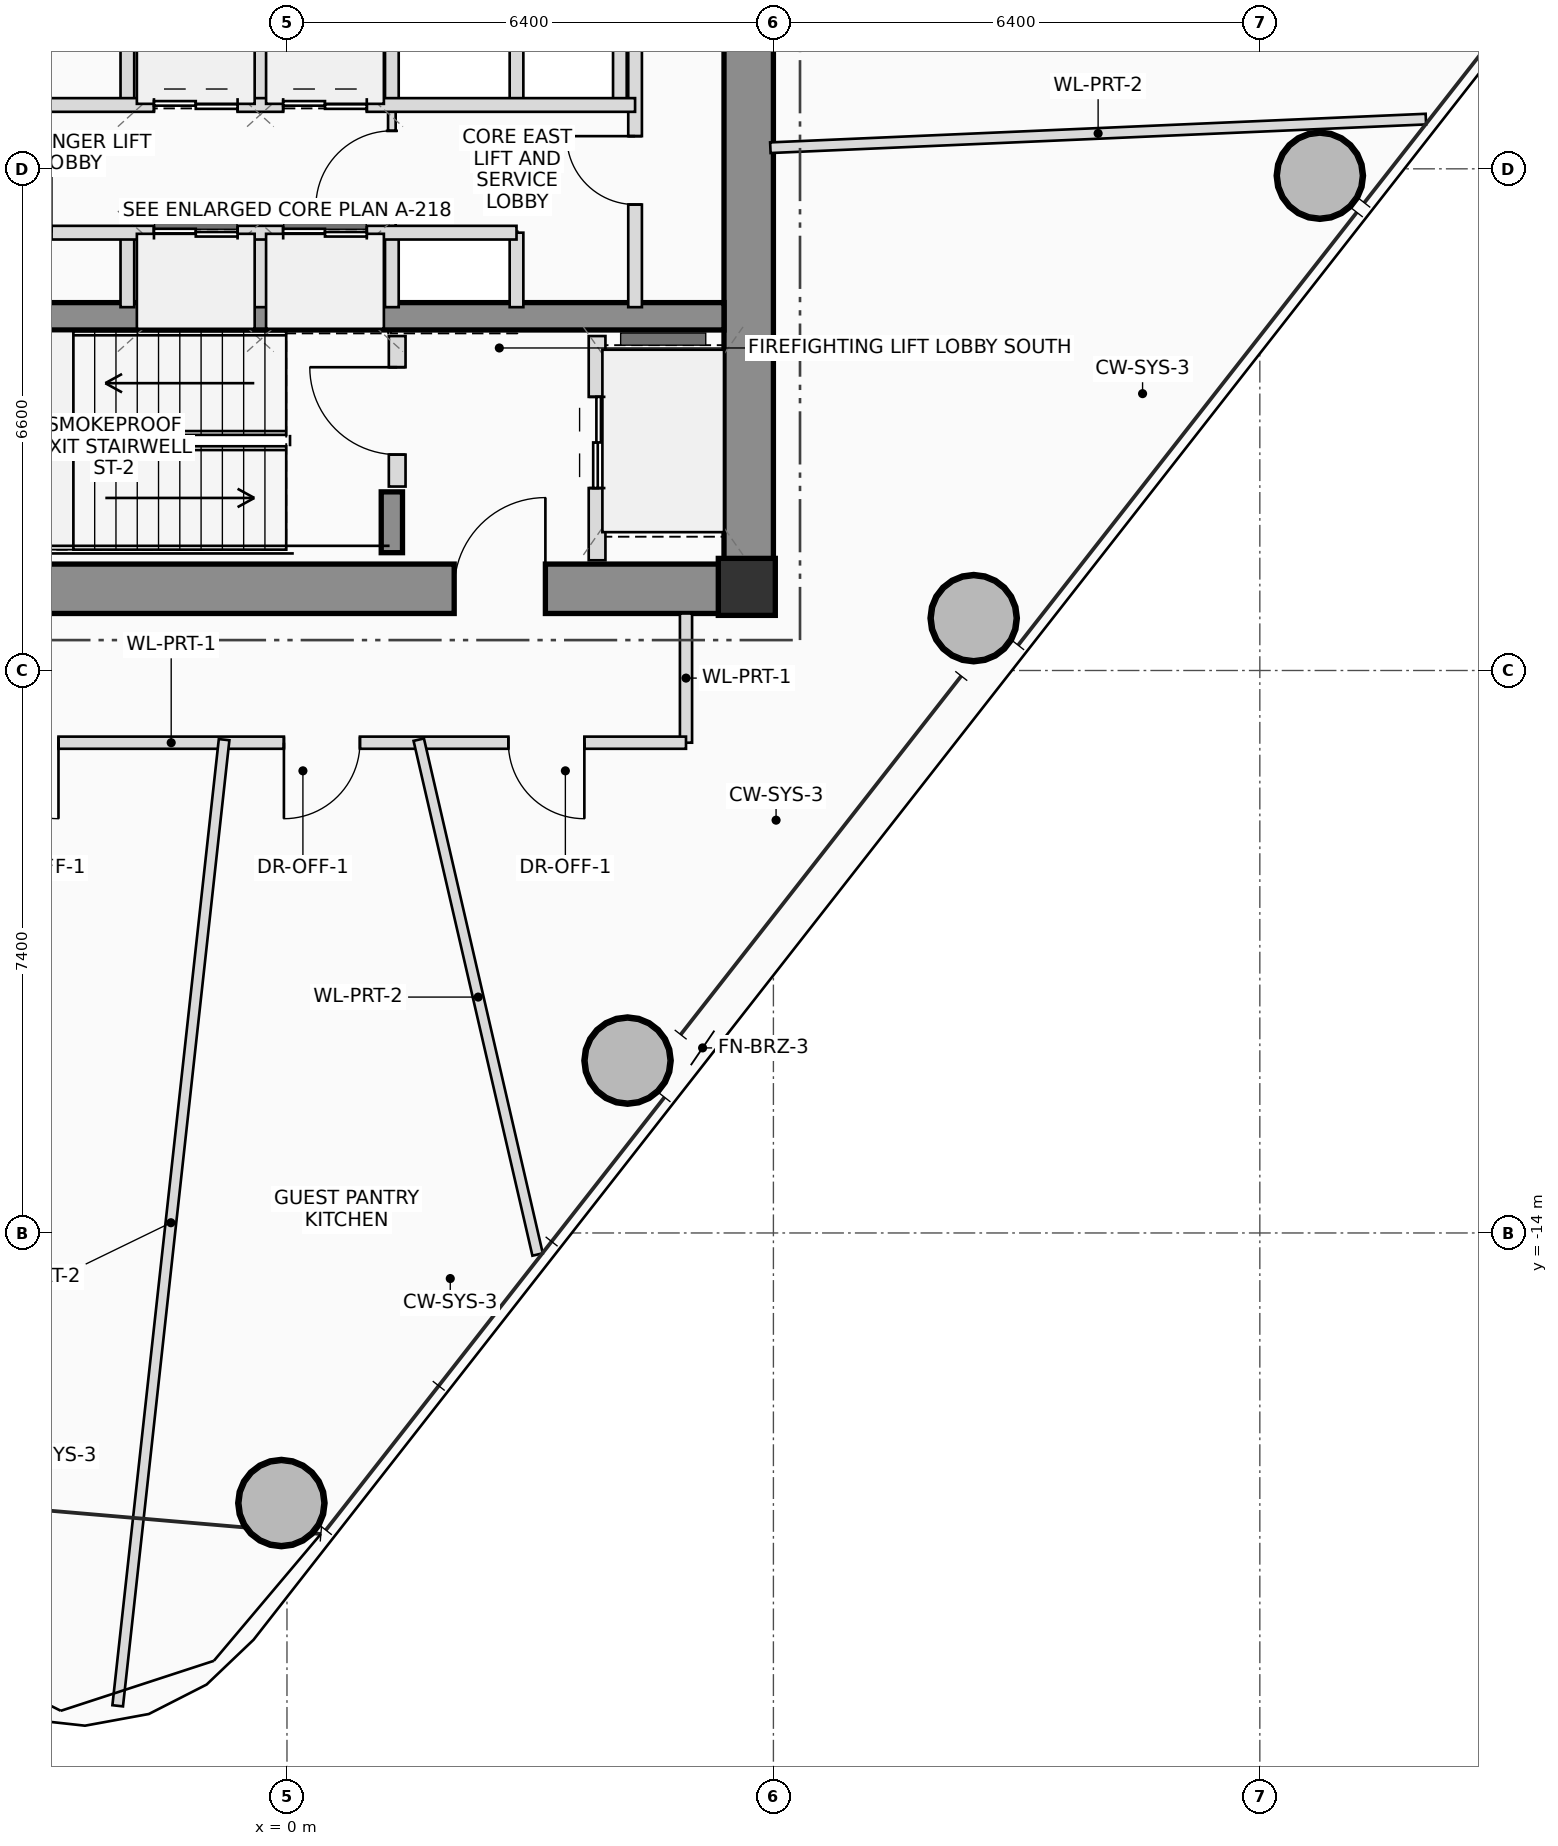
"""IFC4 building model, lengths in metres.
Left out: names, types, materials, properties, quantities, classifications, styles, units other than length and angle.
Written with IfcOpenShell. Run it as: python <this file> out.ifc"""

import sys

from ifc_helpers import new_model, si_unit, direction, frame, frame_2d, origin, origin_2d, place, context, subcontext, project, spatial, rectangle, hollow_circle, extrude, source, transform, mapped, element, fill, save


model = new_model("IFC4")
c1 = context("Model", 3, precision=1e-05, world=origin(), true_north=direction((0.0, 1.0)))
c2 = subcontext(c1, "Body", "Model", "MODEL_VIEW")
j1 = project(units=[si_unit("LENGTHUNIT", "METRE"), si_unit("PLANEANGLEUNIT", "RADIAN")], contexts=[c1])
p1 = place(None, origin())
s1 = spatial("IfcSite", under=j1, at=p1, CompositionType="ELEMENT")
p2 = place(p1, origin())
s2 = spatial("IfcBuilding", under=s1, at=p2, CompositionType="ELEMENT")
p3 = place(p2, frame((0.0, 0.0, 201.8)))
s3 = spatial("IfcBuildingStorey", under=s2, at=p3, CompositionType="ELEMENT", Elevation=201.8)
m1 = source(origin(), c2, "Body", "SweptSolid", [
    extrude(rectangle(XDim=0.75, YDim=0.75, at=origin_2d()), origin(), (0.0, 0.0, 1.0), 3.45),
])
p4 = place(p3, frame((6.05, -5.5, 0.0), z_axis=(0.0, 0.0, 1.0), x_axis=(1.0, 0.0, 0.0)))
e1 = element("IfcColumn", 1, at=p4, inside=s3, PredefinedType="COLUMN", context=c2, shape_type="MappedRepresentation", body=[
    mapped(m1, transform((0.0, 0.0, 0.0), scale=1.0)),
])
p5 = place(p3, frame((-6.4, -5.525, 0.0), z_axis=(0.0, 0.0, 1.0), x_axis=(1.0, 0.0, 0.0)))
e2 = element("IfcWall", 2, at=p5, inside=s3, PredefinedType="SHEAR", context=c2, shape_type="SweptSolid", body=[
    extrude(rectangle(XDim=12.8, YDim=0.65, at=frame_2d((6.4, 0.0))), origin(), (0.0, 0.0, 1.0), 3.45),
])
p6 = place(p5, frame((8.6, 0.0, 0.0)))
e3 = element("IfcOpeningElement", 3, at=p6, cuts=e2, PredefinedType="OPENING", context=c2, shape_type="SweptSolid", body=[
    extrude(rectangle(XDim=1.2, YDim=2.2, at=frame_2d((0.6, 1.1))), frame((0.0, 0.335, 0.0), z_axis=(0.0, -1.0, 0.0), x_axis=(1.0, 0.0, 0.0)), (0.0, 0.0, 1.0), 0.67),
])
p7 = place(p3, frame((6.075, -5.2, 0.0), z_axis=(0.0, 0.0, 1.0), x_axis=(0.0, 1.0, 0.0)))
e4 = element("IfcWall", 4, at=p7, inside=s3, PredefinedType="SHEAR", context=c2, shape_type="SweptSolid", body=[
    extrude(rectangle(XDim=10.4, YDim=0.65, at=frame_2d((5.2, 0.0))), origin(), (0.0, 0.0, 1.0), 3.45),
])
p8 = place(p3, frame((-5.75, -1.94, 0.0), z_axis=(0.0, 0.0, 1.0), x_axis=(1.0, 0.0, 0.0)))
e5 = element("IfcWall", 5, at=p8, inside=s3, PredefinedType="SHEAR", context=c2, shape_type="SweptSolid", body=[
    extrude(rectangle(XDim=11.5, YDim=0.36, at=frame_2d((5.75, 0.0))), origin(), (0.0, 0.0, 1.0), 3.45),
])
p9 = place(p3, frame((1.38, -5.05, 0.0), z_axis=(0.0, 0.0, 1.0), x_axis=(0.0, 1.0, 0.0)))
e6 = element("IfcWall", 6, at=p9, inside=s3, PredefinedType="SHEAR", context=c2, shape_type="SweptSolid", body=[
    extrude(rectangle(XDim=0.8, YDim=0.28, at=frame_2d((0.4, 0.0))), origin(), (0.0, 0.0, 1.0), 3.45),
])
m2 = source(origin(), c2, "Body", "SweptSolid", [
    extrude(hollow_circle(Radius=0.575, WallThickness=0.042, at=origin_2d()), origin(), (0.0, 0.0, 1.0), 3.45),
])
for number, where, z_axis, x_axis in (
    (7, (-0.073, -17.553, 0.0), (0.0, 0.0, 1.0), (1.0, 0.0, 0.0)),
    (8, (4.481, -11.732, 0.0), (0.0, 0.0, 1.0), (1.0, 0.0, 0.0)),
    (9, (9.035, -5.911, 0.0), (0.0, 0.0, 1.0), (1.0, 0.0, 0.0)),
    (10, (13.59, -0.09, 0.0), (0.0, 0.0, 1.0), (1.0, 0.0, 0.0)),
):
    element("IfcColumn", number, at=place(p3, frame(where, z_axis=z_axis, x_axis=x_axis)), inside=s3, PredefinedType="COLUMN", context=c2, shape_type="MappedRepresentation", body=[
        mapped(m2, transform((0.0, 0.0, 0.0), scale=1.0)),
    ])
p10 = place(p3, frame((1.45, -4.18, 0.0), z_axis=(0.0, 0.0, 1.0), x_axis=(0.0, 1.0, 0.0)))
e11 = element("IfcWall", 11, at=p10, inside=s3, PredefinedType="PLUMBINGWALL", context=c2, shape_type="SweptSolid", body=[
    extrude(rectangle(XDim=1.98, YDim=0.22, at=frame_2d((0.99, 0.0))), origin(), (0.0, 0.0, 1.0), 3.25),
])
p11 = place(p10, frame((0.42, 0.0, 0.0)))
e12 = element("IfcOpeningElement", 12, at=p11, cuts=e11, PredefinedType="OPENING", context=c2, shape_type="SweptSolid", body=[
    extrude(rectangle(XDim=1.15, YDim=2.15, at=frame_2d((0.575, 1.075))), frame((0.0, 0.12, 0.0), z_axis=(0.0, -1.0, 0.0), x_axis=(1.0, 0.0, 0.0)), (0.0, 0.0, 1.0), 0.24),
])
p12 = place(p3, frame((4.08, -5.15, 0.0), z_axis=(0.0, 0.0, 1.0), x_axis=(0.0, 1.0, 0.0)))
e13 = element("IfcWall", 13, at=p12, inside=s3, PredefinedType="PLUMBINGWALL", context=c2, shape_type="SweptSolid", body=[
    extrude(rectangle(XDim=2.95, YDim=0.22, at=frame_2d((1.475, 0.0))), origin(), (0.0, 0.0, 1.0), 3.25),
])
p13 = place(p12, frame((0.95, 0.0, 0.0)))
e14 = element("IfcOpeningElement", 14, at=p13, cuts=e13, PredefinedType="OPENING", context=c2, shape_type="SweptSolid", body=[
    extrude(rectangle(XDim=1.2, YDim=2.25, at=frame_2d((0.6, 1.125))), frame((0.0, 0.12, 0.0), z_axis=(0.0, -1.0, 0.0), x_axis=(1.0, 0.0, 0.0)), (0.0, 0.0, 1.0), 0.24),
])
p14 = place(p3, frame((1.38, -0.84, 0.0), z_axis=(0.0, 0.0, 1.0), x_axis=(0.0, 1.0, 0.0)))
e15 = element("IfcWall", 15, at=p14, inside=s3, PredefinedType="PARTITIONING", context=c2, shape_type="SweptSolid", body=[
    extrude(rectangle(XDim=1.68, YDim=0.1, at=frame_2d((0.84, 0.0))), origin(), (0.0, 0.0, 1.0), 3.25),
])
p15 = place(p14, frame((0.34, 0.0, 0.0)))
e16 = element("IfcOpeningElement", 16, at=p15, cuts=e15, PredefinedType="OPENING", context=c2, shape_type="SweptSolid", body=[
    extrude(rectangle(XDim=1.0, YDim=2.25, at=frame_2d((0.5, 1.125))), frame((0.0, 0.06, 0.0), z_axis=(0.0, -1.0, 0.0), x_axis=(1.0, 0.0, 0.0)), (0.0, 0.0, 1.0), 0.12),
])
for number, where, z_axis, x_axis in (
    (17, (-2.1, 0.84, 0.0), (0.0, 0.0, 1.0), (0.0, 1.0, 0.0)),
    (18, (-2.1, -1.82, 0.0), (0.0, 0.0, 1.0), (0.0, 1.0, 0.0)),
    (19, (-0.35, 0.84, 0.0), (0.0, 0.0, 1.0), (0.0, 1.0, 0.0)),
    (20, (-0.35, -1.82, 0.0), (0.0, 0.0, 1.0), (0.0, 1.0, 0.0)),
    (21, (1.38, 0.84, 0.0), (0.0, 0.0, 1.0), (0.0, 1.0, 0.0)),
    (22, (1.38, -1.82, 0.0), (0.0, 0.0, 1.0), (0.0, 1.0, 0.0)),
    (23, (3.02, 0.84, 0.0), (0.0, 0.0, 1.0), (0.0, 1.0, 0.0)),
    (24, (4.38, 0.84, 0.0), (0.0, 0.0, 1.0), (0.0, 1.0, 0.0)),
    (25, (3.02, -1.82, 0.0), (0.0, 0.0, 1.0), (0.0, 1.0, 0.0)),
):
    element("IfcWall", number, at=place(p3, frame(where, z_axis=z_axis, x_axis=x_axis)), inside=s3, PredefinedType="PLUMBINGWALL", context=c2, shape_type="SweptSolid", body=[
        extrude(rectangle(XDim=0.98, YDim=0.18, at=frame_2d((0.49, 0.0))), origin(), (0.0, 0.0, 1.0), 3.25),
    ])
p16 = place(p3, frame((4.58, -1.82, 0.0), z_axis=(0.0, 0.0, 1.0), x_axis=(0.0, 1.0, 0.0)))
e26 = element("IfcWall", 26, at=p16, inside=s3, PredefinedType="PLUMBINGWALL", context=c2, shape_type="SweptSolid", body=[
    extrude(rectangle(XDim=3.64, YDim=0.18, at=frame_2d((1.82, 0.0))), origin(), (0.0, 0.0, 1.0), 3.25),
])
p17 = place(p16, frame((1.35, 0.0, 0.0)))
e27 = element("IfcOpeningElement", 27, at=p17, cuts=e26, PredefinedType="OPENING", context=c2, shape_type="SweptSolid", body=[
    extrude(rectangle(XDim=0.9, YDim=2.05, at=frame_2d((0.45, 1.025))), frame((0.0, 0.1, 0.0), z_axis=(0.0, -1.0, 0.0), x_axis=(1.0, 0.0, 0.0)), (0.0, 0.0, 1.0), 0.2),
])
p18 = place(p3, frame((-5.68, 0.84, 0.0), z_axis=(0.0, 0.0, 1.0), x_axis=(1.0, 0.0, 0.0)))
e28 = element("IfcWall", 28, at=p18, inside=s3, PredefinedType="PLUMBINGWALL", context=c2, shape_type="SweptSolid", body=[
    extrude(rectangle(XDim=10.26, YDim=0.18, at=frame_2d((5.13, 0.0))), origin(), (0.0, 0.0, 1.0), 3.25),
])
p19 = place(p18, frame((1.08, 0.0, 0.0)))
e29 = element("IfcOpeningElement", 29, at=p19, cuts=e28, PredefinedType="OPENING", context=c2, shape_type="SweptSolid", body=[
    extrude(rectangle(XDim=0.9, YDim=2.05, at=frame_2d((0.45, 1.025))), frame((0.0, 0.1, 0.0), z_axis=(0.0, -1.0, 0.0), x_axis=(1.0, 0.0, 0.0)), (0.0, 0.0, 1.0), 0.2),
])
p20 = place(p18, frame((3.93, 0.0, 0.0)))
e30 = element("IfcOpeningElement", 30, at=p20, cuts=e28, PredefinedType="OPENING", context=c2, shape_type="SweptSolid", body=[
    extrude(rectangle(XDim=1.1, YDim=2.2, at=frame_2d((0.55, 1.1))), frame((0.0, 0.1, 0.0), z_axis=(0.0, -1.0, 0.0), x_axis=(1.0, 0.0, 0.0)), (0.0, 0.0, 1.0), 0.2),
])
p21 = place(p18, frame((5.63, 0.0, 0.0)))
e31 = element("IfcOpeningElement", 31, at=p21, cuts=e28, PredefinedType="OPENING", context=c2, shape_type="SweptSolid", body=[
    extrude(rectangle(XDim=1.1, YDim=2.2, at=frame_2d((0.55, 1.1))), frame((0.0, 0.1, 0.0), z_axis=(0.0, -1.0, 0.0), x_axis=(1.0, 0.0, 0.0)), (0.0, 0.0, 1.0), 0.2),
])
p22 = place(p3, frame((-5.68, -0.84, 0.0), z_axis=(0.0, 0.0, 1.0), x_axis=(1.0, 0.0, 0.0)))
e32 = element("IfcWall", 32, at=p22, inside=s3, PredefinedType="PLUMBINGWALL", context=c2, shape_type="SweptSolid", body=[
    extrude(rectangle(XDim=8.7, YDim=0.18, at=frame_2d((4.35, 0.0))), origin(), (0.0, 0.0, 1.0), 3.25),
])
p23 = place(p22, frame((1.68, 0.0, 0.0)))
e33 = element("IfcOpeningElement", 33, at=p23, cuts=e32, PredefinedType="OPENING", context=c2, shape_type="SweptSolid", body=[
    extrude(rectangle(XDim=0.9, YDim=2.05, at=frame_2d((0.45, 1.025))), frame((0.0, 0.1, 0.0), z_axis=(0.0, -1.0, 0.0), x_axis=(1.0, 0.0, 0.0)), (0.0, 0.0, 1.0), 0.2),
])
p24 = place(p22, frame((3.93, 0.0, 0.0)))
e34 = element("IfcOpeningElement", 34, at=p24, cuts=e32, PredefinedType="OPENING", context=c2, shape_type="SweptSolid", body=[
    extrude(rectangle(XDim=1.1, YDim=2.2, at=frame_2d((0.55, 1.1))), frame((0.0, 0.1, 0.0), z_axis=(0.0, -1.0, 0.0), x_axis=(1.0, 0.0, 0.0)), (0.0, 0.0, 1.0), 0.2),
])
p25 = place(p22, frame((5.63, 0.0, 0.0)))
e35 = element("IfcOpeningElement", 35, at=p25, cuts=e32, PredefinedType="OPENING", context=c2, shape_type="SweptSolid", body=[
    extrude(rectangle(XDim=1.1, YDim=2.2, at=frame_2d((0.55, 1.1))), frame((0.0, 0.1, 0.0), z_axis=(0.0, -1.0, 0.0), x_axis=(1.0, 0.0, 0.0)), (0.0, 0.0, 1.0), 0.2),
])
p26 = place(p3, frame((5.25, -5.85, 0.0), z_axis=(0.0, 0.0, 1.0), x_axis=(0.0, -1.0, 0.0)))
e36 = element("IfcWall", 36, at=p26, inside=s3, PredefinedType="PARTITIONING", context=c2, shape_type="SweptSolid", body=[
    extrude(rectangle(XDim=1.7, YDim=0.16, at=frame_2d((0.85, 0.0))), origin(), (0.0, 0.0, 1.0), 3.25),
])
p27 = place(p3, frame((5.25, -7.55, 0.0), z_axis=(0.0, 0.0, 1.0), x_axis=(-1.0, 0.0, 0.0)))
e37 = element("IfcWall", 37, at=p27, inside=s3, PredefinedType="PARTITIONING", context=c2, shape_type="SweptSolid", body=[
    extrude(rectangle(XDim=11.61, YDim=0.16, at=frame_2d((5.805, 0.0))), origin(), (0.0, 0.0, 1.0), 2.605),
])
p28 = place(p27, frame((1.337, 0.0, 0.0)))
e38 = element("IfcOpeningElement", 38, at=p28, cuts=e37, PredefinedType="OPENING", context=c2, shape_type="SweptSolid", body=[
    extrude(rectangle(XDim=1.0, YDim=2.25, at=frame_2d((0.5, 1.125))), frame((0.0, 0.09, 0.0), z_axis=(0.0, -1.0, 0.0), x_axis=(1.0, 0.0, 0.0)), (0.0, 0.0, 1.0), 0.18),
])
p29 = place(p27, frame((4.29, 0.0, 0.0)))
e39 = element("IfcOpeningElement", 39, at=p29, cuts=e37, PredefinedType="OPENING", context=c2, shape_type="SweptSolid", body=[
    extrude(rectangle(XDim=1.0, YDim=2.25, at=frame_2d((0.5, 1.125))), frame((0.0, 0.09, 0.0), z_axis=(0.0, -1.0, 0.0), x_axis=(1.0, 0.0, 0.0)), (0.0, 0.0, 1.0), 0.18),
])
p30 = place(p27, frame((8.256, 0.0, 0.0)))
e40 = element("IfcOpeningElement", 40, at=p30, cuts=e37, PredefinedType="OPENING", context=c2, shape_type="SweptSolid", body=[
    extrude(rectangle(XDim=1.0, YDim=2.25, at=frame_2d((0.5, 1.125))), frame((0.0, 0.09, 0.0), z_axis=(0.0, -1.0, 0.0), x_axis=(1.0, 0.0, 0.0)), (0.0, 0.0, 1.0), 0.18),
])
p31 = place(p3, frame((6.36, 0.278, 0.0), z_axis=(0.0, 0.0, 1.0), x_axis=(0.999047440648, 0.043637270025, 0.0)))
e41 = element("IfcWall", 41, at=p31, inside=s3, PredefinedType="PARTITIONING", context=c2, shape_type="SweptSolid", body=[
    extrude(rectangle(XDim=8.633, YDim=0.14, at=frame_2d((4.316, 0.0))), origin(), (0.0, 0.0, 1.0), 2.605),
])
p32 = place(p3, frame((-0.827, -7.51, 0.0), z_axis=(0.0, 0.0, 1.0), x_axis=(-0.109492708445, -0.993987598915, 0.0)))
e42 = element("IfcWall", 42, at=p32, inside=s3, PredefinedType="PARTITIONING", context=c2, shape_type="SweptSolid", body=[
    extrude(rectangle(XDim=12.788, YDim=0.14, at=frame_2d((6.394, 0.0))), origin(), (0.0, 0.0, 1.0), 2.605),
])
p33 = place(p3, frame((1.734, -7.51, 0.0), z_axis=(0.0, 0.0, 1.0), x_axis=(0.224951847052, -0.974369881774, 0.0)))
e43 = element("IfcWall", 43, at=p33, inside=s3, PredefinedType="PARTITIONING", context=c2, shape_type="SweptSolid", body=[
    extrude(rectangle(XDim=6.951, YDim=0.14, at=frame_2d((3.476, 0.0))), origin(), (0.0, 0.0, 1.0), 2.765),
])
p34 = place(p6, origin())
e44 = element("IfcDoor", 44, at=p34, inside=s3, OperationType="SINGLE_SWING_RIGHT", PredefinedType="DOOR", context=c2, shape_type="SweptSolid", body=[
    extrude(rectangle(XDim=1.2, YDim=2.2, at=frame_2d((0.6, 1.1))), frame((0.0, 0.025, 0.0), z_axis=(0.0, -1.0, 0.0), x_axis=(1.0, 0.0, 0.0)), (0.0, 0.0, 1.0), 0.05),
])
fill(e3, e44)
p35 = place(p11, origin())
e45 = element("IfcDoor", 45, at=p35, inside=s3, OperationType="SINGLE_SWING_RIGHT", PredefinedType="DOOR", context=c2, shape_type="SweptSolid", body=[
    extrude(rectangle(XDim=1.15, YDim=2.15, at=frame_2d((0.575, 1.075))), frame((0.0, 0.025, 0.0), z_axis=(0.0, -1.0, 0.0), x_axis=(1.0, 0.0, 0.0)), (0.0, 0.0, 1.0), 0.05),
])
fill(e12, e45)
p36 = place(p13, origin())
e46 = element("IfcDoor", 46, at=p36, inside=s3, OperationType="DOUBLE_DOOR_SLIDING", PredefinedType="DOOR", context=c2, shape_type="SweptSolid", body=[
    extrude(rectangle(XDim=1.2, YDim=2.25, at=frame_2d((0.6, 1.125))), frame((0.0, 0.025, 0.0), z_axis=(0.0, -1.0, 0.0), x_axis=(1.0, 0.0, 0.0)), (0.0, 0.0, 1.0), 0.05),
])
fill(e14, e46)
p37 = place(p15, origin())
e47 = element("IfcDoor", 47, at=p37, inside=s3, OperationType="SINGLE_SWING_LEFT", PredefinedType="DOOR", context=c2, shape_type="SweptSolid", body=[
    extrude(rectangle(XDim=1.0, YDim=2.25, at=frame_2d((0.5, 1.125))), frame((0.0, 0.025, 0.0), z_axis=(0.0, -1.0, 0.0), x_axis=(1.0, 0.0, 0.0)), (0.0, 0.0, 1.0), 0.05),
])
fill(e16, e47)
p38 = place(p17, origin())
e48 = element("IfcDoor", 48, at=p38, inside=s3, OperationType="SINGLE_SWING_RIGHT", PredefinedType="DOOR", context=c2, shape_type="SweptSolid", body=[
    extrude(rectangle(XDim=0.9, YDim=2.05, at=frame_2d((0.45, 1.025))), frame((0.0, 0.025, 0.0), z_axis=(0.0, -1.0, 0.0), x_axis=(1.0, 0.0, 0.0)), (0.0, 0.0, 1.0), 0.05),
])
fill(e27, e48)
p39 = place(p20, origin())
e49 = element("IfcDoor", 49, at=p39, inside=s3, OperationType="DOUBLE_DOOR_SLIDING", PredefinedType="DOOR", context=c2, shape_type="SweptSolid", body=[
    extrude(rectangle(XDim=1.1, YDim=2.2, at=frame_2d((0.55, 1.1))), frame((0.0, 0.025, 0.0), z_axis=(0.0, -1.0, 0.0), x_axis=(1.0, 0.0, 0.0)), (0.0, 0.0, 1.0), 0.05),
])
fill(e30, e49)
p40 = place(p21, origin())
e50 = element("IfcDoor", 50, at=p40, inside=s3, OperationType="DOUBLE_DOOR_SLIDING", PredefinedType="DOOR", context=c2, shape_type="SweptSolid", body=[
    extrude(rectangle(XDim=1.1, YDim=2.2, at=frame_2d((0.55, 1.1))), frame((0.0, 0.025, 0.0), z_axis=(0.0, -1.0, 0.0), x_axis=(1.0, 0.0, 0.0)), (0.0, 0.0, 1.0), 0.05),
])
fill(e31, e50)
p41 = place(p24, origin())
e51 = element("IfcDoor", 51, at=p41, inside=s3, OperationType="DOUBLE_DOOR_SLIDING", PredefinedType="DOOR", context=c2, shape_type="SweptSolid", body=[
    extrude(rectangle(XDim=1.1, YDim=2.2, at=frame_2d((0.55, 1.1))), frame((0.0, 0.025, 0.0), z_axis=(0.0, -1.0, 0.0), x_axis=(1.0, 0.0, 0.0)), (0.0, 0.0, 1.0), 0.05),
])
fill(e34, e51)
p42 = place(p25, origin())
e52 = element("IfcDoor", 52, at=p42, inside=s3, OperationType="DOUBLE_DOOR_SLIDING", PredefinedType="DOOR", context=c2, shape_type="SweptSolid", body=[
    extrude(rectangle(XDim=1.1, YDim=2.2, at=frame_2d((0.55, 1.1))), frame((0.0, 0.025, 0.0), z_axis=(0.0, -1.0, 0.0), x_axis=(1.0, 0.0, 0.0)), (0.0, 0.0, 1.0), 0.05),
])
fill(e35, e52)
p43 = place(p28, origin())
e53 = element("IfcDoor", 53, at=p43, inside=s3, OperationType="SINGLE_SWING_LEFT", PredefinedType="DOOR", context=c2, shape_type="SweptSolid", body=[
    extrude(rectangle(XDim=1.0, YDim=2.25, at=frame_2d((0.5, 1.125))), frame((0.0, 0.025, 0.0), z_axis=(0.0, -1.0, 0.0), x_axis=(1.0, 0.0, 0.0)), (0.0, 0.0, 1.0), 0.05),
])
fill(e38, e53)
p44 = place(p29, origin())
e54 = element("IfcDoor", 54, at=p44, inside=s3, OperationType="SINGLE_SWING_RIGHT", PredefinedType="DOOR", context=c2, shape_type="SweptSolid", body=[
    extrude(rectangle(XDim=1.0, YDim=2.25, at=frame_2d((0.5, 1.125))), frame((0.0, 0.025, 0.0), z_axis=(0.0, -1.0, 0.0), x_axis=(1.0, 0.0, 0.0)), (0.0, 0.0, 1.0), 0.05),
])
fill(e39, e54)
p45 = place(p30, origin())
e55 = element("IfcDoor", 55, at=p45, inside=s3, OperationType="SINGLE_SWING_LEFT", PredefinedType="DOOR", context=c2, shape_type="SweptSolid", body=[
    extrude(rectangle(XDim=1.0, YDim=2.25, at=frame_2d((0.5, 1.125))), frame((0.0, 0.025, 0.0), z_axis=(0.0, -1.0, 0.0), x_axis=(1.0, 0.0, 0.0)), (0.0, 0.0, 1.0), 0.05),
])
fill(e40, e55)
save(model, sys.argv[1])
